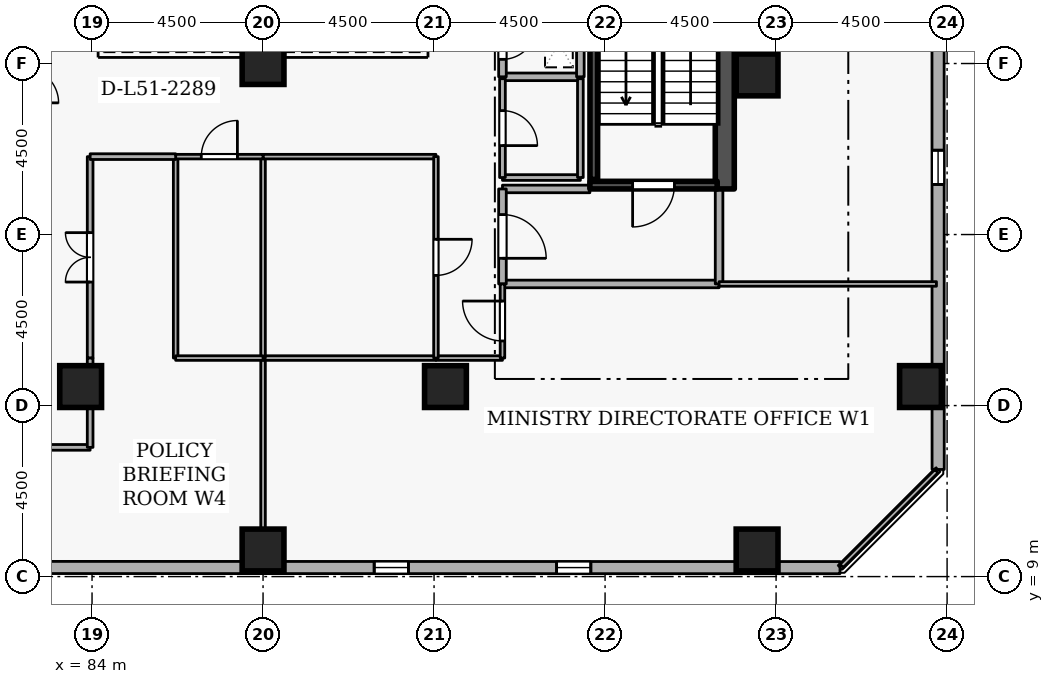
"""IFC4 building model, lengths in metres.
Left out: names, types, materials, properties, quantities, classifications, styles, units other than length and angle.
Written with IfcOpenShell. Run it as: python <this file> out.ifc"""

import sys

from ifc_helpers import new_model, si_unit, direction, frame, frame_2d, origin, origin_2d, place, context, subcontext, project, spatial, rectangle, extrude, element, fill, save


model = new_model("IFC4")
c1 = context("Model", 3, precision=1e-05, world=origin(), true_north=direction((0.0, 1.0)))
c2 = subcontext(c1, "Body", "Model", "MODEL_VIEW")
j1 = project(units=[si_unit("LENGTHUNIT", "METRE"), si_unit("PLANEANGLEUNIT", "RADIAN")], contexts=[c1])
p1 = place(None, origin())
s1 = spatial("IfcSite", under=j1, at=p1, CompositionType="ELEMENT")
p2 = place(p1, origin())
s2 = spatial("IfcBuilding", under=s1, at=p2, CompositionType="ELEMENT")
p3 = place(p2, frame((0.0, 0.0, 192.9)))
s3 = spatial("IfcBuildingStorey", under=s2, at=p3, CompositionType="ELEMENT", Elevation=192.9)
p4 = place(p3, frame((100.65, 19.2, 0.0), z_axis=(0.0, 0.0, 1.0), x_axis=(0.0, 1.0, 0.0)))
e1 = element("IfcWall", 1, at=p4, inside=s3, PredefinedType="SHEAR", context=c2, shape_type="SweptSolid", body=[
    extrude(rectangle(XDim=15.6, YDim=0.5, at=frame_2d((7.8, 0.0))), origin(), (0.0, 0.0, 1.0), 3.6),
])
for number, where, z_axis, x_axis in (
    (2, (105.8, 14.0, 0.0), (0.0, 0.0, 1.0), (1.0, 0.0, 0.0)),
    (3, (101.5, 9.7, 0.0), (0.0, 0.0, 1.0), (1.0, 0.0, 0.0)),
    (4, (88.5, 9.7, 0.0), (0.0, 0.0, 1.0), (1.0, 0.0, 0.0)),
    (5, (93.3, 14.0, 0.0), (0.0, 0.0, 1.0), (1.0, 0.0, 0.0)),
    (6, (83.7, 14.0, 0.0), (0.0, 0.0, 1.0), (1.0, 0.0, 0.0)),
    (7, (101.5, 22.2, 0.0), (0.0, 0.0, 1.0), (1.0, 0.0, 0.0)),
    (8, (88.5, 22.5, 0.0), (0.0, 0.0, 1.0), (1.0, 0.0, 0.0)),
):
    element("IfcColumn", number, at=place(p3, frame(where, z_axis=z_axis, x_axis=x_axis)), inside=s3, PredefinedType="COLUMN", context=c2, shape_type="SweptSolid", body=[
        extrude(rectangle(XDim=1.1, YDim=1.1, at=origin_2d()), origin(), (0.0, 0.0, 1.0), 3.6),
    ])
p5 = place(p3, frame((69.525, 9.243, 0.0), z_axis=(0.0, 0.0, 1.0), x_axis=(0.99999997701, -0.000214431216, 0.0)))
e9 = element("IfcWall", 9, at=p5, inside=s3, PredefinedType="STANDARD", context=c2, shape_type="SweptSolid", body=[
    extrude(rectangle(XDim=34.156, YDim=0.32, at=frame_2d((17.078, 0.0))), origin(), (0.0, 0.0, 1.0), 2.7),
])
p6 = place(p5, frame((2.7, 0.0, 0.72)))
e10 = element("IfcOpeningElement", 10, at=p6, cuts=e9, PredefinedType="OPENING", context=c2, shape_type="SweptSolid", body=[
    extrude(rectangle(XDim=0.9, YDim=1.75, at=frame_2d((0.45, 0.875))), frame((0.0, 0.17, 0.0), z_axis=(0.0, -1.0, 0.0), x_axis=(1.0, 0.0, 0.0)), (0.0, 0.0, 1.0), 0.34),
])
p7 = place(p5, frame((7.5, 0.0, 0.72)))
e11 = element("IfcOpeningElement", 11, at=p7, cuts=e9, PredefinedType="OPENING", context=c2, shape_type="SweptSolid", body=[
    extrude(rectangle(XDim=0.9, YDim=1.75, at=frame_2d((0.45, 0.875))), frame((0.0, 0.17, 0.0), z_axis=(0.0, -1.0, 0.0), x_axis=(1.0, 0.0, 0.0)), (0.0, 0.0, 1.0), 0.34),
])
p8 = place(p5, frame((12.3, 0.0, 0.72)))
e12 = element("IfcOpeningElement", 12, at=p8, cuts=e9, PredefinedType="OPENING", context=c2, shape_type="SweptSolid", body=[
    extrude(rectangle(XDim=0.9, YDim=1.75, at=frame_2d((0.45, 0.875))), frame((0.0, 0.17, 0.0), z_axis=(0.0, -1.0, 0.0), x_axis=(1.0, 0.0, 0.0)), (0.0, 0.0, 1.0), 0.34),
])
p9 = place(p5, frame((21.9, 0.0, 0.72)))
e13 = element("IfcOpeningElement", 13, at=p9, cuts=e9, PredefinedType="OPENING", context=c2, shape_type="SweptSolid", body=[
    extrude(rectangle(XDim=0.9, YDim=1.75, at=frame_2d((0.45, 0.875))), frame((0.0, 0.17, 0.0), z_axis=(0.0, -1.0, 0.0), x_axis=(1.0, 0.0, 0.0)), (0.0, 0.0, 1.0), 0.34),
])
p10 = place(p5, frame((26.7, 0.0, 0.72)))
e14 = element("IfcOpeningElement", 14, at=p10, cuts=e9, PredefinedType="OPENING", context=c2, shape_type="SweptSolid", body=[
    extrude(rectangle(XDim=0.9, YDim=1.75, at=frame_2d((0.45, 0.875))), frame((0.0, 0.17, 0.0), z_axis=(0.0, -1.0, 0.0), x_axis=(1.0, 0.0, 0.0)), (0.0, 0.0, 1.0), 0.34),
])
p11 = place(p3, frame((106.265, 11.819, 0.0), z_axis=(0.0, 0.0, 1.0), x_axis=(-0.000214431216, 0.99999997701, 0.0)))
e15 = element("IfcWall", 15, at=p11, inside=s3, PredefinedType="STANDARD", context=c2, shape_type="SweptSolid", body=[
    extrude(rectangle(XDim=34.156, YDim=0.32, at=frame_2d((17.078, 0.0))), origin(), (0.0, 0.0, 1.0), 2.7),
])
p12 = place(p11, frame((7.5, 0.0, 0.72)))
e16 = element("IfcOpeningElement", 16, at=p12, cuts=e15, PredefinedType="OPENING", context=c2, shape_type="SweptSolid", body=[
    extrude(rectangle(XDim=0.9, YDim=1.75, at=frame_2d((0.45, 0.875))), frame((0.0, 0.17, 0.0), z_axis=(0.0, -1.0, 0.0), x_axis=(1.0, 0.0, 0.0)), (0.0, 0.0, 1.0), 0.34),
])
p13 = place(p11, frame((12.3, 0.0, 0.72)))
e17 = element("IfcOpeningElement", 17, at=p13, cuts=e15, PredefinedType="OPENING", context=c2, shape_type="SweptSolid", body=[
    extrude(rectangle(XDim=0.9, YDim=1.75, at=frame_2d((0.45, 0.875))), frame((0.0, 0.17, 0.0), z_axis=(0.0, -1.0, 0.0), x_axis=(1.0, 0.0, 0.0)), (0.0, 0.0, 1.0), 0.34),
])
p14 = place(p11, frame((17.1, 0.0, 0.72)))
e18 = element("IfcOpeningElement", 18, at=p14, cuts=e15, PredefinedType="OPENING", context=c2, shape_type="SweptSolid", body=[
    extrude(rectangle(XDim=0.9, YDim=1.75, at=frame_2d((0.45, 0.875))), frame((0.0, 0.17, 0.0), z_axis=(0.0, -1.0, 0.0), x_axis=(1.0, 0.0, 0.0)), (0.0, 0.0, 1.0), 0.34),
])
p15 = place(p11, frame((21.9, 0.0, 0.72)))
e19 = element("IfcOpeningElement", 19, at=p15, cuts=e15, PredefinedType="OPENING", context=c2, shape_type="SweptSolid", body=[
    extrude(rectangle(XDim=0.9, YDim=1.75, at=frame_2d((0.45, 0.875))), frame((0.0, 0.17, 0.0), z_axis=(0.0, -1.0, 0.0), x_axis=(1.0, 0.0, 0.0)), (0.0, 0.0, 1.0), 0.34),
])
p16 = place(p11, frame((31.5, 0.0, 0.72)))
e20 = element("IfcOpeningElement", 20, at=p16, cuts=e15, PredefinedType="OPENING", context=c2, shape_type="SweptSolid", body=[
    extrude(rectangle(XDim=0.9, YDim=1.75, at=frame_2d((0.45, 0.875))), frame((0.0, 0.17, 0.0), z_axis=(0.0, -1.0, 0.0), x_axis=(1.0, 0.0, 0.0)), (0.0, 0.0, 1.0), 0.34),
])
p17 = place(p3, frame((100.45, 19.3, 0.0), z_axis=(0.0, 0.0, 1.0), x_axis=(-1.0, 0.0, 0.0)))
e21 = element("IfcWall", 21, at=p17, inside=s3, PredefinedType="SHEAR", context=c2, shape_type="SweptSolid", body=[
    extrude(rectangle(XDim=3.35, YDim=0.2, at=frame_2d((1.675, 0.0))), origin(), (0.0, 0.0, 1.0), 3.6),
])
p18 = place(p17, frame((1.125, 0.0, 0.0)))
e22 = element("IfcOpeningElement", 22, at=p18, cuts=e21, PredefinedType="OPENING", context=c2, shape_type="SweptSolid", body=[
    extrude(rectangle(XDim=1.1, YDim=2.1, at=frame_2d((0.55, 1.05))), frame((0.0, 0.11, 0.0), z_axis=(0.0, -1.0, 0.0), x_axis=(1.0, 0.0, 0.0)), (0.0, 0.0, 1.0), 0.22),
])
p19 = place(p3, frame((97.203, 26.55, 0.0), z_axis=(0.0, 0.0, 1.0), x_axis=(0.0, -1.0, 0.0)))
e23 = element("IfcWall", 23, at=p19, inside=s3, PredefinedType="SHEAR", context=c2, shape_type="SweptSolid", body=[
    extrude(rectangle(XDim=7.1, YDim=0.2, at=frame_2d((3.55, 0.0))), origin(), (0.0, 0.0, 1.0), 3.6),
])
p20 = place(p3, frame((94.8, 16.7, 0.0), z_axis=(0.0, 0.0, 1.0), x_axis=(1.0, 0.0, 0.0)))
e24 = element("IfcWall", 24, at=p20, inside=s3, PredefinedType="STANDARD", context=c2, shape_type="SweptSolid", body=[
    extrude(rectangle(XDim=5.7, YDim=0.2, at=frame_2d((2.85, 0.0))), origin(), (0.0, 0.0, 1.0), 3.34),
])
p21 = place(p3, frame((100.5, 16.7, 0.0), z_axis=(0.0, 0.0, 1.0), x_axis=(0.0, 1.0, 0.0)))
e25 = element("IfcWall", 25, at=p21, inside=s3, PredefinedType="STANDARD", context=c2, shape_type="SweptSolid", body=[
    extrude(rectangle(XDim=2.5, YDim=0.2, at=frame_2d((1.25, 0.0))), origin(), (0.0, 0.0, 1.0), 3.34),
])
p22 = place(p3, frame((97.1, 19.2, 0.0), z_axis=(0.0, 0.0, 1.0), x_axis=(-1.0, 0.0, 0.0)))
e26 = element("IfcWall", 26, at=p22, inside=s3, PredefinedType="STANDARD", context=c2, shape_type="SweptSolid", body=[
    extrude(rectangle(XDim=2.3, YDim=0.2, at=frame_2d((1.15, 0.0))), origin(), (0.0, 0.0, 1.0), 2.545),
])
p23 = place(p3, frame((94.8, 19.2, 0.0), z_axis=(0.0, 0.0, 1.0), x_axis=(0.0, -1.0, 0.0)))
e27 = element("IfcWall", 27, at=p23, inside=s3, PredefinedType="STANDARD", context=c2, shape_type="SweptSolid", body=[
    extrude(rectangle(XDim=2.5, YDim=0.2, at=frame_2d((1.25, 0.0))), origin(), (0.0, 0.0, 1.0), 3.34),
])
p24 = place(p23, frame((0.675, 0.0, 0.0)))
e28 = element("IfcOpeningElement", 28, at=p24, cuts=e27, PredefinedType="OPENING", context=c2, shape_type="SweptSolid", body=[
    extrude(rectangle(XDim=1.15, YDim=2.1, at=frame_2d((0.575, 1.05))), frame((0.0, 0.11, 0.0), z_axis=(0.0, -1.0, 0.0), x_axis=(1.0, 0.0, 0.0)), (0.0, 0.0, 1.0), 0.22),
])
p25 = place(p3, frame((94.8, 22.15, 0.0), z_axis=(0.0, 0.0, 1.0), x_axis=(1.0, 0.0, 0.0)))
e29 = element("IfcWall", 29, at=p25, inside=s3, PredefinedType="STANDARD", context=c2, shape_type="SweptSolid", body=[
    extrude(rectangle(XDim=2.05, YDim=0.2, at=frame_2d((1.025, 0.0))), origin(), (0.0, 0.0, 1.0), 3.34),
])
p26 = place(p3, frame((96.85, 22.15, 0.0), z_axis=(0.0, 0.0, 1.0), x_axis=(0.0, 1.0, 0.0)))
e30 = element("IfcWall", 30, at=p26, inside=s3, PredefinedType="STANDARD", context=c2, shape_type="SweptSolid", body=[
    extrude(rectangle(XDim=1.8, YDim=0.2, at=frame_2d((0.9, 0.0))), origin(), (0.0, 0.0, 1.0), 3.34),
])
p27 = place(p3, frame((94.8, 23.95, 0.0), z_axis=(0.0, 0.0, 1.0), x_axis=(0.0, -1.0, 0.0)))
e31 = element("IfcWall", 31, at=p27, inside=s3, PredefinedType="STANDARD", context=c2, shape_type="SweptSolid", body=[
    extrude(rectangle(XDim=1.8, YDim=0.2, at=frame_2d((0.9, 0.0))), origin(), (0.0, 0.0, 1.0), 3.34),
])
p28 = place(p27, frame((0.46, 0.0, 0.0)))
e32 = element("IfcOpeningElement", 32, at=p28, cuts=e31, PredefinedType="OPENING", context=c2, shape_type="SweptSolid", body=[
    extrude(rectangle(XDim=0.88, YDim=2.04, at=frame_2d((0.44, 1.02))), frame((0.0, 0.11, 0.0), z_axis=(0.0, -1.0, 0.0), x_axis=(1.0, 0.0, 0.0)), (0.0, 0.0, 1.0), 0.22),
])
p29 = place(p3, frame((94.8, 19.5, 0.0), z_axis=(0.0, 0.0, 1.0), x_axis=(1.0, 0.0, 0.0)))
e33 = element("IfcWall", 33, at=p29, inside=s3, PredefinedType="PARTITIONING", context=c2, shape_type="SweptSolid", body=[
    extrude(rectangle(XDim=2.05, YDim=0.15, at=frame_2d((1.025, 0.0))), origin(), (0.0, 0.0, 1.0), 2.545),
])
p30 = place(p3, frame((96.85, 19.5, 0.0), z_axis=(0.0, 0.0, 1.0), x_axis=(0.0, 1.0, 0.0)))
e34 = element("IfcWall", 34, at=p30, inside=s3, PredefinedType="PARTITIONING", context=c2, shape_type="SweptSolid", body=[
    extrude(rectangle(XDim=2.6, YDim=0.15, at=frame_2d((1.3, 0.0))), origin(), (0.0, 0.0, 1.0), 3.34),
])
p31 = place(p3, frame((94.8, 22.1, 0.0), z_axis=(0.0, 0.0, 1.0), x_axis=(0.0, -1.0, 0.0)))
e35 = element("IfcWall", 35, at=p31, inside=s3, PredefinedType="PARTITIONING", context=c2, shape_type="SweptSolid", body=[
    extrude(rectangle(XDim=2.6, YDim=0.15, at=frame_2d((1.3, 0.0))), origin(), (0.0, 0.0, 1.0), 3.34),
])
p32 = place(p31, frame((0.84, 0.0, 0.0)))
e36 = element("IfcOpeningElement", 36, at=p32, cuts=e35, PredefinedType="OPENING", context=c2, shape_type="SweptSolid", body=[
    extrude(rectangle(XDim=0.92, YDim=2.08, at=frame_2d((0.46, 1.04))), frame((0.0, 0.085, 0.0), z_axis=(0.0, -1.0, 0.0), x_axis=(1.0, 0.0, 0.0)), (0.0, 0.0, 1.0), 0.17),
])
p33 = place(p3, frame((88.5, 9.7, 0.0), z_axis=(0.0, 0.0, 1.0), x_axis=(0.0, 1.0, 0.0)))
e37 = element("IfcWall", 37, at=p33, inside=s3, PredefinedType="PARTITIONING", context=c2, shape_type="SweptSolid", body=[
    extrude(rectangle(XDim=5.05, YDim=0.12, at=frame_2d((2.525, 0.0))), origin(), (0.0, 0.0, 1.0), 2.882),
])
p34 = place(p3, frame((88.5, 14.75, 0.0), z_axis=(0.0, 0.0, 1.0), x_axis=(1.0, 0.0, 0.0)))
e38 = element("IfcWall", 38, at=p34, inside=s3, PredefinedType="PARTITIONING", context=c2, shape_type="SweptSolid", body=[
    extrude(rectangle(XDim=4.55, YDim=0.12, at=frame_2d((2.275, 0.0))), origin(), (0.0, 0.0, 1.0), 3.34),
])
p35 = place(p3, frame((93.05, 14.75, 0.0), z_axis=(0.0, 0.0, 1.0), x_axis=(1.0, 0.0, 0.0)))
e39 = element("IfcWall", 39, at=p35, inside=s3, PredefinedType="PARTITIONING", context=c2, shape_type="SweptSolid", body=[
    extrude(rectangle(XDim=1.75, YDim=0.12, at=frame_2d((0.875, 0.0))), origin(), (0.0, 0.0, 1.0), 3.34),
])
p36 = place(p3, frame((94.8, 14.75, 0.0), z_axis=(0.0, 0.0, 1.0), x_axis=(0.0, 1.0, 0.0)))
e40 = element("IfcWall", 40, at=p36, inside=s3, PredefinedType="PARTITIONING", context=c2, shape_type="SweptSolid", body=[
    extrude(rectangle(XDim=1.95, YDim=0.12, at=frame_2d((0.975, 0.0))), origin(), (0.0, 0.0, 1.0), 3.34),
])
p37 = place(p36, frame((0.45, 0.0, 0.0)))
e41 = element("IfcOpeningElement", 41, at=p37, cuts=e40, PredefinedType="OPENING", context=c2, shape_type="SweptSolid", body=[
    extrude(rectangle(XDim=1.05, YDim=2.1, at=frame_2d((0.525, 1.05))), frame((0.0, 0.07, 0.0), z_axis=(0.0, -1.0, 0.0), x_axis=(1.0, 0.0, 0.0)), (0.0, 0.0, 1.0), 0.14),
])
p38 = place(p3, frame((100.5, 16.7, 0.0), z_axis=(0.0, 0.0, 1.0), x_axis=(1.0, 0.0, 0.0)))
e42 = element("IfcWall", 42, at=p38, inside=s3, PredefinedType="PARTITIONING", context=c2, shape_type="SweptSolid", body=[
    extrude(rectangle(XDim=5.72, YDim=0.12, at=frame_2d((2.86, 0.0))), origin(), (0.0, 0.0, 1.0), 3.34),
])
p39 = place(p3, frame((106.22, 11.775, 0.0), z_axis=(0.0, 0.0, 1.0), x_axis=(-0.707106781187, -0.707106781187, 0.0)))
e43 = element("IfcWall", 43, at=p39, inside=s3, PredefinedType="PARTITIONING", context=c2, shape_type="SweptSolid", body=[
    extrude(rectangle(XDim=3.528, YDim=0.12, at=frame_2d((1.764, 0.0))), origin(), (0.0, 0.0, 1.0), 3.34),
])
p40 = place(p3, frame((88.5, 14.75, 0.0), z_axis=(0.0, 0.0, 1.0), x_axis=(0.0, 1.0, 0.0)))
e44 = element("IfcWall", 44, at=p40, inside=s3, PredefinedType="PARTITIONING", context=c2, shape_type="SweptSolid", body=[
    extrude(rectangle(XDim=5.3, YDim=0.12, at=frame_2d((2.65, 0.0))), origin(), (0.0, 0.0, 1.0), 2.882),
])
p41 = place(p3, frame((88.5, 20.05, 0.0), z_axis=(0.0, 0.0, 1.0), x_axis=(1.0, 0.0, 0.0)))
e45 = element("IfcWall", 45, at=p41, inside=s3, PredefinedType="PARTITIONING", context=c2, shape_type="SweptSolid", body=[
    extrude(rectangle(XDim=4.55, YDim=0.12, at=frame_2d((2.275, 0.0))), origin(), (0.0, 0.0, 1.0), 3.34),
])
p42 = place(p3, frame((93.05, 20.05, 0.0), z_axis=(0.0, 0.0, 1.0), x_axis=(0.0, -1.0, 0.0)))
e46 = element("IfcWall", 46, at=p42, inside=s3, PredefinedType="PARTITIONING", context=c2, shape_type="SweptSolid", body=[
    extrude(rectangle(XDim=5.3, YDim=0.12, at=frame_2d((2.65, 0.0))), origin(), (0.0, 0.0, 1.0), 3.34),
])
p43 = place(p42, frame((2.175, 0.0, 0.0)))
e47 = element("IfcOpeningElement", 47, at=p43, cuts=e46, PredefinedType="OPENING", context=c2, shape_type="SweptSolid", body=[
    extrude(rectangle(XDim=0.95, YDim=2.1, at=frame_2d((0.475, 1.05))), frame((0.0, 0.07, 0.0), z_axis=(0.0, -1.0, 0.0), x_axis=(1.0, 0.0, 0.0)), (0.0, 0.0, 1.0), 0.14),
])
p44 = place(p3, frame((86.2, 14.75, 0.0), z_axis=(0.0, 0.0, 1.0), x_axis=(0.0, 1.0, 0.0)))
e48 = element("IfcWall", 48, at=p44, inside=s3, PredefinedType="PARTITIONING", context=c2, shape_type="SweptSolid", body=[
    extrude(rectangle(XDim=5.3, YDim=0.12, at=frame_2d((2.65, 0.0))), origin(), (0.0, 0.0, 1.0), 3.34),
])
p45 = place(p3, frame((86.2, 20.05, 0.0), z_axis=(0.0, 0.0, 1.0), x_axis=(1.0, 0.0, 0.0)))
e49 = element("IfcWall", 49, at=p45, inside=s3, PredefinedType="PARTITIONING", context=c2, shape_type="SweptSolid", body=[
    extrude(rectangle(XDim=2.3, YDim=0.12, at=frame_2d((1.15, 0.0))), origin(), (0.0, 0.0, 1.0), 3.34),
])
p46 = place(p45, frame((0.675, 0.0, 0.0)))
e50 = element("IfcOpeningElement", 50, at=p46, cuts=e49, PredefinedType="OPENING", context=c2, shape_type="SweptSolid", body=[
    extrude(rectangle(XDim=0.95, YDim=2.1, at=frame_2d((0.475, 1.05))), frame((0.0, 0.07, 0.0), z_axis=(0.0, -1.0, 0.0), x_axis=(1.0, 0.0, 0.0)), (0.0, 0.0, 1.0), 0.14),
])
p47 = place(p3, frame((88.5, 14.75, 0.0), z_axis=(0.0, 0.0, 1.0), x_axis=(-1.0, 0.0, 0.0)))
e51 = element("IfcWall", 51, at=p47, inside=s3, PredefinedType="PARTITIONING", context=c2, shape_type="SweptSolid", body=[
    extrude(rectangle(XDim=2.3, YDim=0.12, at=frame_2d((1.15, 0.0))), origin(), (0.0, 0.0, 1.0), 3.34),
])
p48 = place(p3, frame((83.95, 14.75, 0.0), z_axis=(0.0, 0.0, 1.0), x_axis=(0.0, 1.0, 0.0)))
e52 = element("IfcWall", 52, at=p48, inside=s3, PredefinedType="PARTITIONING", context=c2, shape_type="SweptSolid", body=[
    extrude(rectangle(XDim=5.3, YDim=0.15, at=frame_2d((2.65, 0.0))), origin(), (0.0, 0.0, 1.0), 3.34),
])
p49 = place(p48, frame((2.0, 0.0, 0.0)))
e53 = element("IfcOpeningElement", 53, at=p49, cuts=e52, PredefinedType="OPENING", context=c2, shape_type="SweptSolid", body=[
    extrude(rectangle(XDim=1.3, YDim=2.12, at=frame_2d((0.65, 1.06))), frame((0.0, 0.085, 0.0), z_axis=(0.0, -1.0, 0.0), x_axis=(1.0, 0.0, 0.0)), (0.0, 0.0, 1.0), 0.17),
])
p50 = place(p3, frame((83.95, 20.05, 0.0), z_axis=(0.0, 0.0, 1.0), x_axis=(1.0, 0.0, 0.0)))
e54 = element("IfcWall", 54, at=p50, inside=s3, PredefinedType="PARTITIONING", context=c2, shape_type="SweptSolid", body=[
    extrude(rectangle(XDim=2.25, YDim=0.15, at=frame_2d((1.125, 0.0))), origin(), (0.0, 0.0, 1.0), 3.34),
])
p51 = place(p3, frame((81.748, 12.4, 0.0), z_axis=(0.0, 0.0, 1.0), x_axis=(1.0, 0.0, 0.0)))
e55 = element("IfcWall", 55, at=p51, inside=s3, PredefinedType="PARTITIONING", context=c2, shape_type="SweptSolid", body=[
    extrude(rectangle(XDim=2.202, YDim=0.15, at=frame_2d((1.101, 0.0))), origin(), (0.0, 0.0, 1.0), 3.34),
])
p52 = place(p3, frame((83.95, 12.4, 0.0), z_axis=(0.0, 0.0, 1.0), x_axis=(0.0, 1.0, 0.0)))
e56 = element("IfcWall", 56, at=p52, inside=s3, PredefinedType="PARTITIONING", context=c2, shape_type="SweptSolid", body=[
    extrude(rectangle(XDim=2.35, YDim=0.15, at=frame_2d((1.175, 0.0))), origin(), (0.0, 0.0, 1.0), 3.34),
])
p53 = place(p9, origin())
e57 = element("IfcWindow", 57, at=p53, inside=s3, PartitioningType="SINGLE_PANEL", PredefinedType="WINDOW", context=c2, shape_type="SweptSolid", body=[
    extrude(rectangle(XDim=0.9, YDim=1.75, at=frame_2d((0.45, 0.875))), frame((0.0, 0.03, 0.0), z_axis=(0.0, -1.0, 0.0), x_axis=(1.0, 0.0, 0.0)), (0.0, 0.0, 1.0), 0.06),
])
fill(e13, e57)
p54 = place(p10, origin())
e58 = element("IfcWindow", 58, at=p54, inside=s3, PartitioningType="SINGLE_PANEL", PredefinedType="WINDOW", context=c2, shape_type="SweptSolid", body=[
    extrude(rectangle(XDim=0.9, YDim=1.75, at=frame_2d((0.45, 0.875))), frame((0.0, 0.03, 0.0), z_axis=(0.0, -1.0, 0.0), x_axis=(1.0, 0.0, 0.0)), (0.0, 0.0, 1.0), 0.06),
])
fill(e14, e58)
p55 = place(p12, origin())
e59 = element("IfcWindow", 59, at=p55, inside=s3, PartitioningType="SINGLE_PANEL", PredefinedType="WINDOW", context=c2, shape_type="SweptSolid", body=[
    extrude(rectangle(XDim=0.9, YDim=1.75, at=frame_2d((0.45, 0.875))), frame((0.0, 0.03, 0.0), z_axis=(0.0, -1.0, 0.0), x_axis=(1.0, 0.0, 0.0)), (0.0, 0.0, 1.0), 0.06),
])
fill(e16, e59)
p56 = place(p18, origin())
e60 = element("IfcDoor", 60, at=p56, inside=s3, OperationType="SINGLE_SWING_RIGHT", PredefinedType="DOOR", context=c2, shape_type="SweptSolid", body=[
    extrude(rectangle(XDim=1.1, YDim=2.1, at=frame_2d((0.55, 1.05))), frame((0.0, 0.025, 0.0), z_axis=(0.0, -1.0, 0.0), x_axis=(1.0, 0.0, 0.0)), (0.0, 0.0, 1.0), 0.05),
])
fill(e22, e60)
p57 = place(p24, origin())
e61 = element("IfcDoor", 61, at=p57, inside=s3, OperationType="SINGLE_SWING_RIGHT", PredefinedType="DOOR", context=c2, shape_type="SweptSolid", body=[
    extrude(rectangle(XDim=1.15, YDim=2.1, at=frame_2d((0.575, 1.05))), frame((0.0, 0.025, 0.0), z_axis=(0.0, -1.0, 0.0), x_axis=(1.0, 0.0, 0.0)), (0.0, 0.0, 1.0), 0.05),
])
fill(e28, e61)
p58 = place(p28, origin())
e62 = element("IfcDoor", 62, at=p58, inside=s3, OperationType="SINGLE_SWING_LEFT", PredefinedType="DOOR", context=c2, shape_type="SweptSolid", body=[
    extrude(rectangle(XDim=0.88, YDim=2.04, at=frame_2d((0.44, 1.02))), frame((0.0, 0.025, 0.0), z_axis=(0.0, -1.0, 0.0), x_axis=(1.0, 0.0, 0.0)), (0.0, 0.0, 1.0), 0.05),
])
fill(e32, e62)
p59 = place(p32, origin())
e63 = element("IfcDoor", 63, at=p59, inside=s3, OperationType="SINGLE_SWING_RIGHT", PredefinedType="DOOR", context=c2, shape_type="SweptSolid", body=[
    extrude(rectangle(XDim=0.92, YDim=2.08, at=frame_2d((0.46, 1.04))), frame((0.0, 0.025, 0.0), z_axis=(0.0, -1.0, 0.0), x_axis=(1.0, 0.0, 0.0)), (0.0, 0.0, 1.0), 0.05),
])
fill(e36, e63)
p60 = place(p37, origin())
e64 = element("IfcDoor", 64, at=p60, inside=s3, OperationType="SINGLE_SWING_RIGHT", PredefinedType="DOOR", context=c2, shape_type="SweptSolid", body=[
    extrude(rectangle(XDim=1.05, YDim=2.1, at=frame_2d((0.525, 1.05))), frame((0.0, 0.025, 0.0), z_axis=(0.0, -1.0, 0.0), x_axis=(1.0, 0.0, 0.0)), (0.0, 0.0, 1.0), 0.05),
])
fill(e41, e64)
p61 = place(p43, origin())
e65 = element("IfcDoor", 65, at=p61, inside=s3, OperationType="SINGLE_SWING_LEFT", PredefinedType="DOOR", context=c2, shape_type="SweptSolid", body=[
    extrude(rectangle(XDim=0.95, YDim=2.1, at=frame_2d((0.475, 1.05))), frame((0.0, 0.025, 0.0), z_axis=(0.0, -1.0, 0.0), x_axis=(1.0, 0.0, 0.0)), (0.0, 0.0, 1.0), 0.05),
])
fill(e47, e65)
p62 = place(p46, origin())
e66 = element("IfcDoor", 66, at=p62, inside=s3, OperationType="SINGLE_SWING_RIGHT", PredefinedType="DOOR", context=c2, shape_type="SweptSolid", body=[
    extrude(rectangle(XDim=0.95, YDim=2.1, at=frame_2d((0.475, 1.05))), frame((0.0, 0.025, 0.0), z_axis=(0.0, -1.0, 0.0), x_axis=(1.0, 0.0, 0.0)), (0.0, 0.0, 1.0), 0.05),
])
fill(e50, e66)
p63 = place(p49, origin())
e67 = element("IfcDoor", 67, at=p63, inside=s3, OperationType="DOUBLE_DOOR_SINGLE_SWING", PredefinedType="DOOR", context=c2, shape_type="SweptSolid", body=[
    extrude(rectangle(XDim=1.3, YDim=2.12, at=frame_2d((0.65, 1.06))), frame((0.0, 0.025, 0.0), z_axis=(0.0, -1.0, 0.0), x_axis=(1.0, 0.0, 0.0)), (0.0, 0.0, 1.0), 0.05),
])
fill(e53, e67)
save(model, sys.argv[1])
